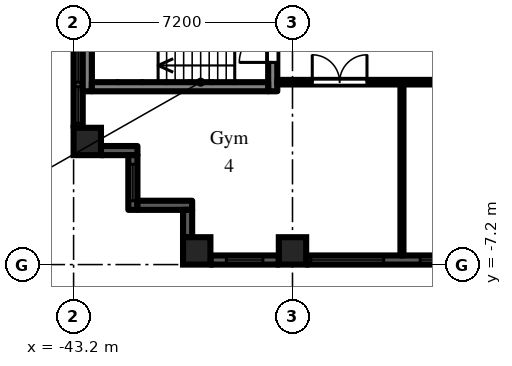
"""IFC4 building model, lengths in metres.
Left out: names, types, materials, properties, quantities, classifications, styles, units other than length and angle.
Written with IfcOpenShell. Run it as: python <this file> out.ifc"""

import sys

from ifc_helpers import new_model, si_unit, direction, frame, frame_2d, origin, origin_2d, place, context, subcontext, project, spatial, rectangle, extrude, element, fill, save


model = new_model("IFC4")
c1 = context("Model", 3, precision=1e-05, world=origin(), true_north=direction((0.0, 1.0)))
c2 = subcontext(c1, "Body", "Model", "MODEL_VIEW")
j1 = project(units=[si_unit("LENGTHUNIT", "METRE"), si_unit("PLANEANGLEUNIT", "RADIAN")], contexts=[c1])
p1 = place(None, origin())
s1 = spatial("IfcSite", under=j1, at=p1, CompositionType="ELEMENT")
p2 = place(p1, origin())
s2 = spatial("IfcBuilding", under=s1, at=p2, CompositionType="ELEMENT")
p3 = place(p2, frame((0.0, 0.0, 29.7)))
s3 = spatial("IfcBuildingStorey", under=s2, at=p3, CompositionType="ELEMENT", Elevation=29.7)
for number, where, z_axis, x_axis in (
    (1, (-42.75, -3.15, 0.0), (0.0, 0.0, 1.0), (1.0, 0.0, 0.0)),
    (2, (-39.15, -6.75, 0.0), (0.0, 0.0, 1.0), (1.0, 0.0, 0.0)),
    (3, (-36.0, -6.75, 0.0), (0.0, 0.0, 1.0), (1.0, 0.0, 0.0)),
):
    element("IfcColumn", number, at=place(p3, frame(where, z_axis=z_axis, x_axis=x_axis)), inside=s3, PredefinedType="COLUMN", context=c2, shape_type="SweptSolid", body=[
        extrude(rectangle(XDim=0.9, YDim=0.9, at=origin_2d()), origin(), (0.0, 0.0, 1.0), 3.0),
    ])
p4 = place(p3, frame((-43.05, 2.7, 0.0), z_axis=(0.0, 0.0, 1.0), x_axis=(0.0, -1.0, 0.0)))
e4 = element("IfcWall", 4, at=p4, inside=s3, PredefinedType="SOLIDWALL", context=c2, shape_type="SweptSolid", body=[
    extrude(rectangle(XDim=5.4, YDim=0.3, at=frame_2d((2.7, 0.0))), origin(), (0.0, 0.0, 1.0), 2.1),
])
p5 = place(p4, frame((1.5, 0.0, 0.2)))
e5 = element("IfcOpeningElement", 5, at=p5, cuts=e4, PredefinedType="OPENING", context=c2, shape_type="SweptSolid", body=[
    extrude(rectangle(XDim=2.4, YDim=1.85, at=frame_2d((1.2, 0.925))), frame((0.0, 0.16, 0.0), z_axis=(0.0, -1.0, 0.0), x_axis=(1.0, 0.0, 0.0)), (0.0, 0.0, 1.0), 0.32),
])
p6 = place(p4, frame((0.15, 0.0, 0.2)))
e6 = element("IfcOpeningElement", 6, at=p6, cuts=e4, PredefinedType="OPENING", context=c2, shape_type="SweptSolid", body=[
    extrude(rectangle(XDim=1.2, YDim=1.85, at=frame_2d((0.6, 0.925))), frame((0.0, 0.16, 0.0), z_axis=(0.0, -1.0, 0.0), x_axis=(1.0, 0.0, 0.0)), (0.0, 0.0, 1.0), 0.32),
])
p7 = place(p4, frame((4.05, 0.0, 0.2)))
e7 = element("IfcOpeningElement", 7, at=p7, cuts=e4, PredefinedType="OPENING", context=c2, shape_type="SweptSolid", body=[
    extrude(rectangle(XDim=1.2, YDim=1.85, at=frame_2d((0.6, 0.925))), frame((0.0, 0.16, 0.0), z_axis=(0.0, -1.0, 0.0), x_axis=(1.0, 0.0, 0.0)), (0.0, 0.0, 1.0), 0.32),
])
p8 = place(p3, frame((-42.3, -3.45, 0.0), z_axis=(0.0, 0.0, 1.0), x_axis=(1.0, 0.0, 0.0)))
e8 = element("IfcWall", 8, at=p8, inside=s3, PredefinedType="SOLIDWALL", context=c2, shape_type="SweptSolid", body=[
    extrude(rectangle(XDim=1.2, YDim=0.3, at=frame_2d((0.6, 0.0))), origin(), (0.0, 0.0, 1.0), 2.575),
])
p9 = place(p3, frame((-41.25, -3.6, 0.0), z_axis=(0.0, 0.0, 1.0), x_axis=(0.0, -1.0, 0.0)))
e9 = element("IfcWall", 9, at=p9, inside=s3, PredefinedType="SOLIDWALL", context=c2, shape_type="SweptSolid", body=[
    extrude(rectangle(XDim=1.8, YDim=0.3, at=frame_2d((0.9, 0.0))), origin(), (0.0, 0.0, 1.0), 2.575),
])
p10 = place(p9, frame((0.3, 0.0, 0.2)))
e10 = element("IfcOpeningElement", 10, at=p10, cuts=e9, PredefinedType="OPENING", context=c2, shape_type="SweptSolid", body=[
    extrude(rectangle(XDim=1.2, YDim=1.85, at=frame_2d((0.6, 0.925))), frame((0.0, 0.16, 0.0), z_axis=(0.0, -1.0, 0.0), x_axis=(1.0, 0.0, 0.0)), (0.0, 0.0, 1.0), 0.32),
])
p11 = place(p3, frame((-41.1, -5.25, 0.0), z_axis=(0.0, 0.0, 1.0), x_axis=(1.0, 0.0, 0.0)))
e11 = element("IfcWall", 11, at=p11, inside=s3, PredefinedType="SOLIDWALL", context=c2, shape_type="SweptSolid", body=[
    extrude(rectangle(XDim=1.8, YDim=0.3, at=frame_2d((0.9, 0.0))), origin(), (0.0, 0.0, 1.0), 2.575),
])
p12 = place(p3, frame((-39.45, -5.4, 0.0), z_axis=(0.0, 0.0, 1.0), x_axis=(0.0, -1.0, 0.0)))
e12 = element("IfcWall", 12, at=p12, inside=s3, PredefinedType="SOLIDWALL", context=c2, shape_type="SweptSolid", body=[
    extrude(rectangle(XDim=0.9, YDim=0.3, at=frame_2d((0.45, 0.0))), origin(), (0.0, 0.0, 1.0), 2.575),
])
p13 = place(p3, frame((-38.7, -7.05, 0.0), z_axis=(0.0, 0.0, 1.0), x_axis=(1.0, 0.0, 0.0)))
e13 = element("IfcWall", 13, at=p13, inside=s3, PredefinedType="SOLIDWALL", context=c2, shape_type="SweptSolid", body=[
    extrude(rectangle(XDim=2.25, YDim=0.3, at=frame_2d((1.125, 0.0))), origin(), (0.0, 0.0, 1.0), 2.1),
])
p14 = place(p13, frame((0.525, 0.0, 0.2)))
e14 = element("IfcOpeningElement", 14, at=p14, cuts=e13, PredefinedType="OPENING", context=c2, shape_type="SweptSolid", body=[
    extrude(rectangle(XDim=1.2, YDim=1.85, at=frame_2d((0.6, 0.925))), frame((0.0, 0.16, 0.0), z_axis=(0.0, -1.0, 0.0), x_axis=(1.0, 0.0, 0.0)), (0.0, 0.0, 1.0), 0.32),
])
p15 = place(p3, frame((-35.55, -7.05, 0.0), z_axis=(0.0, 0.0, 1.0), x_axis=(1.0, 0.0, 0.0)))
e15 = element("IfcWall", 15, at=p15, inside=s3, PredefinedType="SOLIDWALL", context=c2, shape_type="SweptSolid", body=[
    extrude(rectangle(XDim=6.3, YDim=0.3, at=frame_2d((3.15, 0.0))), origin(), (0.0, 0.0, 1.0), 2.1),
])
p16 = place(p15, frame((0.15, 0.0, 0.2)))
e16 = element("IfcOpeningElement", 16, at=p16, cuts=e15, PredefinedType="OPENING", context=c2, shape_type="SweptSolid", body=[
    extrude(rectangle(XDim=2.4, YDim=1.85, at=frame_2d((1.2, 0.925))), frame((0.0, 0.16, 0.0), z_axis=(0.0, -1.0, 0.0), x_axis=(1.0, 0.0, 0.0)), (0.0, 0.0, 1.0), 0.32),
])
p17 = place(p15, frame((3.75, 0.0, 0.2)))
e17 = element("IfcOpeningElement", 17, at=p17, cuts=e15, PredefinedType="OPENING", context=c2, shape_type="SweptSolid", body=[
    extrude(rectangle(XDim=2.4, YDim=1.85, at=frame_2d((1.2, 0.925))), frame((0.0, 0.16, 0.0), z_axis=(0.0, -1.0, 0.0), x_axis=(1.0, 0.0, 0.0)), (0.0, 0.0, 1.0), 0.32),
])
p18 = place(p3, frame((-36.65, -1.5, 0.0), z_axis=(0.0, 0.0, 1.0), x_axis=(0.0, 1.0, 0.0)))
e18 = element("IfcWall", 18, at=p18, inside=s3, PredefinedType="SHEAR", context=c2, shape_type="SweptSolid", body=[
    extrude(rectangle(XDim=3.0, YDim=0.3, at=frame_2d((1.5, 0.0))), origin(), (0.0, 0.0, 1.0), 2.575),
])
p19 = place(p18, frame((0.95, 0.0, 0.0)))
e19 = element("IfcOpeningElement", 19, at=p19, cuts=e18, PredefinedType="OPENING", context=c2, shape_type="SweptSolid", body=[
    extrude(rectangle(XDim=1.1, YDim=2.1, at=frame_2d((0.55, 1.05))), frame((0.0, 0.16, 0.0), z_axis=(0.0, -1.0, 0.0), x_axis=(1.0, 0.0, 0.0)), (0.0, 0.0, 1.0), 0.32),
])
p20 = place(p3, frame((-42.75, -1.5, 0.0), z_axis=(0.0, 0.0, 1.0), x_axis=(0.0, 1.0, 0.0)))
e20 = element("IfcWall", 20, at=p20, inside=s3, PredefinedType="SHEAR", context=c2, shape_type="SweptSolid", body=[
    extrude(rectangle(XDim=3.0, YDim=0.3, at=frame_2d((1.5, 0.0))), origin(), (0.0, 0.0, 1.0), 2.575),
])
p21 = place(p3, frame((-36.8, -1.35, 0.0), z_axis=(0.0, 0.0, 1.0), x_axis=(-1.0, 0.0, 0.0)))
e21 = element("IfcWall", 21, at=p21, inside=s3, PredefinedType="SHEAR", context=c2, shape_type="SweptSolid", body=[
    extrude(rectangle(XDim=5.8, YDim=0.3, at=frame_2d((2.9, 0.0))), origin(), (0.0, 0.0, 1.0), 2.575),
])
p22 = place(p3, frame((-36.5, -1.2, 0.0), z_axis=(0.0, 0.0, 1.0), x_axis=(1.0, 0.0, 0.0)))
e22 = element("IfcWall", 22, at=p22, inside=s3, PredefinedType="PARTITIONING", context=c2, shape_type="SweptSolid", body=[
    extrude(rectangle(XDim=14.9, YDim=0.15, at=frame_2d((7.45, 0.0))), origin(), (0.0, 0.0, 1.0), 2.575),
])
p23 = place(p22, frame((10.4, 0.0, 0.0)))
e23 = element("IfcOpeningElement", 23, at=p23, cuts=e22, PredefinedType="OPENING", context=c2, shape_type="SweptSolid", body=[
    extrude(rectangle(XDim=1.8, YDim=2.1, at=frame_2d((0.9, 1.05))), frame((0.0, 0.085, 0.0), z_axis=(0.0, -1.0, 0.0), x_axis=(1.0, 0.0, 0.0)), (0.0, 0.0, 1.0), 0.17),
])
p24 = place(p22, frame((5.45, 0.0, 0.0)))
e24 = element("IfcOpeningElement", 24, at=p24, cuts=e22, PredefinedType="OPENING", context=c2, shape_type="SweptSolid", body=[
    extrude(rectangle(XDim=0.9, YDim=2.1, at=frame_2d((0.45, 1.05))), frame((0.0, 0.085, 0.0), z_axis=(0.0, -1.0, 0.0), x_axis=(1.0, 0.0, 0.0)), (0.0, 0.0, 1.0), 0.17),
])
p25 = place(p22, frame((1.15, 0.0, 0.0)))
e25 = element("IfcOpeningElement", 25, at=p25, cuts=e22, PredefinedType="OPENING", context=c2, shape_type="SweptSolid", body=[
    extrude(rectangle(XDim=1.8, YDim=2.1, at=frame_2d((0.9, 1.05))), frame((0.0, 0.085, 0.0), z_axis=(0.0, -1.0, 0.0), x_axis=(1.0, 0.0, 0.0)), (0.0, 0.0, 1.0), 0.17),
])
p26 = place(p3, frame((-32.4, -6.9, 0.0), z_axis=(0.0, 0.0, 1.0), x_axis=(0.0, 1.0, 0.0)))
e26 = element("IfcWall", 26, at=p26, inside=s3, PredefinedType="PARTITIONING", context=c2, shape_type="SweptSolid", body=[
    extrude(rectangle(XDim=5.625, YDim=0.1, at=frame_2d((2.812, 0.0))), origin(), (0.0, 0.0, 1.0), 2.575),
])
p27 = place(p5, origin())
e27 = element("IfcWindow", 27, at=p27, inside=s3, PartitioningType="SINGLE_PANEL", PredefinedType="WINDOW", context=c2, shape_type="SweptSolid", body=[
    extrude(rectangle(XDim=2.4, YDim=1.85, at=frame_2d((1.2, 0.925))), frame((0.0, 0.03, 0.0), z_axis=(0.0, -1.0, 0.0), x_axis=(1.0, 0.0, 0.0)), (0.0, 0.0, 1.0), 0.06),
])
fill(e5, e27)
p28 = place(p7, origin())
e28 = element("IfcWindow", 28, at=p28, inside=s3, PartitioningType="SINGLE_PANEL", PredefinedType="WINDOW", context=c2, shape_type="SweptSolid", body=[
    extrude(rectangle(XDim=1.2, YDim=1.85, at=frame_2d((0.6, 0.925))), frame((0.0, 0.03, 0.0), z_axis=(0.0, -1.0, 0.0), x_axis=(1.0, 0.0, 0.0)), (0.0, 0.0, 1.0), 0.06),
])
fill(e7, e28)
p29 = place(p10, origin())
e29 = element("IfcWindow", 29, at=p29, inside=s3, PartitioningType="SINGLE_PANEL", PredefinedType="WINDOW", context=c2, shape_type="SweptSolid", body=[
    extrude(rectangle(XDim=1.2, YDim=1.85, at=frame_2d((0.6, 0.925))), frame((0.0, 0.03, 0.0), z_axis=(0.0, -1.0, 0.0), x_axis=(1.0, 0.0, 0.0)), (0.0, 0.0, 1.0), 0.06),
])
fill(e10, e29)
p30 = place(p14, origin())
e30 = element("IfcWindow", 30, at=p30, inside=s3, PartitioningType="SINGLE_PANEL", PredefinedType="WINDOW", context=c2, shape_type="SweptSolid", body=[
    extrude(rectangle(XDim=1.2, YDim=1.85, at=frame_2d((0.6, 0.925))), frame((0.0, 0.03, 0.0), z_axis=(0.0, -1.0, 0.0), x_axis=(1.0, 0.0, 0.0)), (0.0, 0.0, 1.0), 0.06),
])
fill(e14, e30)
p31 = place(p16, origin())
e31 = element("IfcWindow", 31, at=p31, inside=s3, PartitioningType="SINGLE_PANEL", PredefinedType="WINDOW", context=c2, shape_type="SweptSolid", body=[
    extrude(rectangle(XDim=2.4, YDim=1.85, at=frame_2d((1.2, 0.925))), frame((0.0, 0.03, 0.0), z_axis=(0.0, -1.0, 0.0), x_axis=(1.0, 0.0, 0.0)), (0.0, 0.0, 1.0), 0.06),
])
fill(e16, e31)
p32 = place(p17, origin())
e32 = element("IfcWindow", 32, at=p32, inside=s3, PartitioningType="SINGLE_PANEL", PredefinedType="WINDOW", context=c2, shape_type="SweptSolid", body=[
    extrude(rectangle(XDim=2.4, YDim=1.85, at=frame_2d((1.2, 0.925))), frame((0.0, 0.03, 0.0), z_axis=(0.0, -1.0, 0.0), x_axis=(1.0, 0.0, 0.0)), (0.0, 0.0, 1.0), 0.06),
])
fill(e17, e32)
p33 = place(p19, origin())
e33 = element("IfcDoor", 33, at=p33, inside=s3, OperationType="SINGLE_SWING_LEFT", PredefinedType="DOOR", context=c2, shape_type="SweptSolid", body=[
    extrude(rectangle(XDim=1.1, YDim=2.1, at=frame_2d((0.55, 1.05))), frame((0.0, 0.025, 0.0), z_axis=(0.0, -1.0, 0.0), x_axis=(1.0, 0.0, 0.0)), (0.0, 0.0, 1.0), 0.05),
])
fill(e19, e33)
p34 = place(p25, origin())
e34 = element("IfcDoor", 34, at=p34, inside=s3, OperationType="DOUBLE_DOOR_DOUBLE_SWING", PredefinedType="DOOR", context=c2, shape_type="SweptSolid", body=[
    extrude(rectangle(XDim=1.8, YDim=2.1, at=frame_2d((0.9, 1.05))), frame((0.0, 0.025, 0.0), z_axis=(0.0, -1.0, 0.0), x_axis=(1.0, 0.0, 0.0)), (0.0, 0.0, 1.0), 0.05),
])
fill(e25, e34)
save(model, sys.argv[1])
